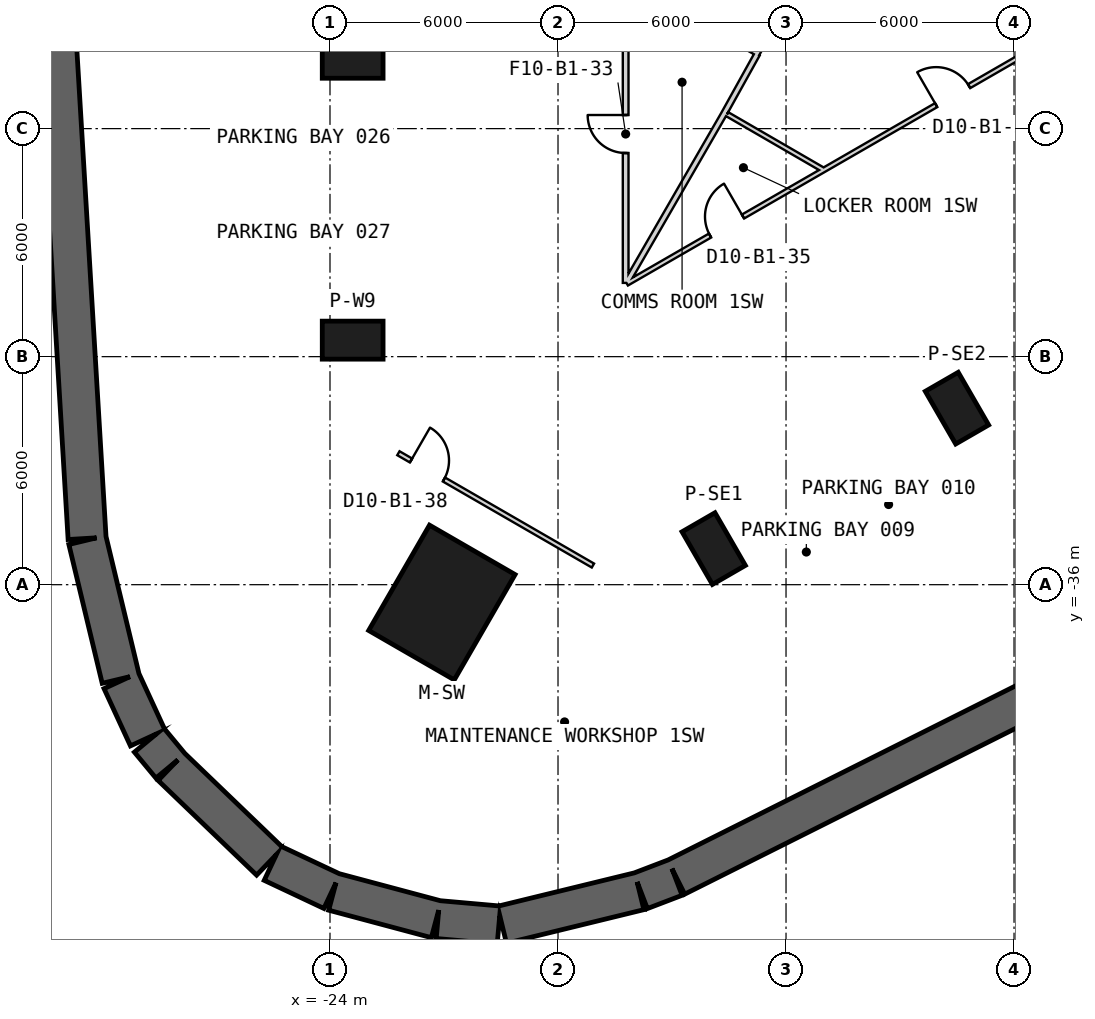
"""IFC4 building model, lengths in metres.
Left out: names, types, materials, properties, quantities, classifications, styles, units other than length and angle.
Written with IfcOpenShell. Run it as: python <this file> out.ifc"""

import sys

from ifc_helpers import new_model, si_unit, direction, frame, frame_2d, origin, origin_2d, place, context, subcontext, project, spatial, rectangle, extrude, element, fill, save


model = new_model("IFC4")
c1 = context("Model", 3, precision=1e-05, world=origin(), true_north=direction((0.0, 1.0)))
c2 = subcontext(c1, "Body", "Model", "MODEL_VIEW")
j1 = project(units=[si_unit("LENGTHUNIT", "METRE"), si_unit("PLANEANGLEUNIT", "RADIAN")], contexts=[c1])
p1 = place(None, origin())
s1 = spatial("IfcSite", under=j1, at=p1, CompositionType="ELEMENT")
p2 = place(p1, origin())
s2 = spatial("IfcBuilding", under=s1, at=p2, CompositionType="ELEMENT")
p3 = place(p2, frame((0.0, 0.0, -5.5)))
s3 = spatial("IfcBuildingStorey", under=s2, at=p3, CompositionType="ELEMENT", Elevation=-5.5)
p4 = place(p3, frame((-2.296, -37.386, 0.0), z_axis=(0.0, 0.0, 1.0), x_axis=(-0.894073358408, -0.447920561914, 0.0)))
e1 = element("IfcWall", 1, at=p4, inside=s3, PredefinedType="SHEAR", context=c2, shape_type="SweptSolid", body=[
    extrude(rectangle(XDim=14.087, YDim=1.0, at=frame_2d((7.043, 0.0))), origin(), (0.0, 0.0, 1.0), 5.5),
])
p5 = place(p3, frame((-14.913, -43.706, 0.0), z_axis=(0.0, 0.0, 1.0), x_axis=(-0.934037171443, -0.35717581436, 0.0)))
e2 = element("IfcWall", 2, at=p5, inside=s3, PredefinedType="SHEAR", context=c2, shape_type="SweptSolid", body=[
    extrude(rectangle(XDim=0.98, YDim=1.0, at=frame_2d((0.49, 0.0))), origin(), (0.0, 0.0, 1.0), 5.5),
])
p6 = place(p3, frame((-15.858, -44.065, 0.0), z_axis=(0.0, 0.0, 1.0), x_axis=(-0.971462854696, -0.23719174089, 0.0)))
e3 = element("IfcWall", 3, at=p6, inside=s3, PredefinedType="SHEAR", context=c2, shape_type="SweptSolid", body=[
    extrude(rectangle(XDim=3.722, YDim=1.0, at=frame_2d((1.861, 0.0))), origin(), (0.0, 0.0, 1.0), 5.5),
])
p7 = place(p3, frame((-19.556, -44.954, 0.0), z_axis=(0.0, 0.0, 1.0), x_axis=(-0.996078576516, 0.088472986872, 0.0)))
e4 = element("IfcWall", 4, at=p7, inside=s3, PredefinedType="SHEAR", context=c2, shape_type="SweptSolid", body=[
    extrude(rectangle(XDim=1.612, YDim=1.0, at=frame_2d((0.806, 0.0))), origin(), (0.0, 0.0, 1.0), 5.5),
])
p8 = place(p3, frame((-21.203, -44.804, 0.0), z_axis=(0.0, 0.0, 1.0), x_axis=(-0.966098633902, 0.258173254954, 0.0)))
e5 = element("IfcWall", 5, at=p8, inside=s3, PredefinedType="SHEAR", context=c2, shape_type="SweptSolid", body=[
    extrude(rectangle(XDim=2.797, YDim=1.0, at=frame_2d((1.398, 0.0))), origin(), (0.0, 0.0, 1.0), 5.5),
])
p9 = place(p3, frame((-23.948, -44.067, 0.0), z_axis=(0.0, 0.0, 1.0), x_axis=(-0.904675187163, 0.42610187248, 0.0)))
e6 = element("IfcWall", 6, at=p9, inside=s3, PredefinedType="SHEAR", context=c2, shape_type="SweptSolid", body=[
    extrude(rectangle(XDim=1.736, YDim=1.0, at=frame_2d((0.868, 0.0))), origin(), (0.0, 0.0, 1.0), 5.5),
])
p10 = place(p3, frame((-25.585, -43.281, 0.0), z_axis=(0.0, 0.0, 1.0), x_axis=(-0.720994904491, 0.692940363738, 0.0)))
e7 = element("IfcWall", 7, at=p10, inside=s3, PredefinedType="SHEAR", context=c2, shape_type="SweptSolid", body=[
    extrude(rectangle(XDim=3.594, YDim=1.0, at=frame_2d((1.797, 0.0))), origin(), (0.0, 0.0, 1.0), 5.5),
])
p11 = place(p3, frame((-28.195, -40.77, 0.0), z_axis=(0.0, 0.0, 1.0), x_axis=(-0.638451148032, 0.769662349071, 0.0)))
e8 = element("IfcWall", 8, at=p11, inside=s3, PredefinedType="SHEAR", context=c2, shape_type="SweptSolid", body=[
    extrude(rectangle(XDim=0.887, YDim=1.0, at=frame_2d((0.444, 0.0))), origin(), (0.0, 0.0, 1.0), 5.5),
])
p12 = place(p3, frame((-28.796, -40.032, 0.0), z_axis=(0.0, 0.0, 1.0), x_axis=(-0.419048850016, 0.907963689417, 0.0)))
e9 = element("IfcWall", 9, at=p12, inside=s3, PredefinedType="SHEAR", context=c2, shape_type="SweptSolid", body=[
    extrude(rectangle(XDim=1.66, YDim=1.0, at=frame_2d((0.83, 0.0))), origin(), (0.0, 0.0, 1.0), 5.5),
])
p13 = place(p3, frame((-29.508, -38.479, 0.0), z_axis=(0.0, 0.0, 1.0), x_axis=(-0.233520396998, 0.972351903472, 0.0)))
e10 = element("IfcWall", 10, at=p13, inside=s3, PredefinedType="SHEAR", context=c2, shape_type="SweptSolid", body=[
    extrude(rectangle(XDim=3.758, YDim=1.0, at=frame_2d((1.879, 0.0))), origin(), (0.0, 0.0, 1.0), 5.5),
])
p14 = place(p3, frame((-30.392, -34.782, 0.0), z_axis=(0.0, 0.0, 1.0), x_axis=(-0.059791438035, 0.998210891514, 0.0)))
e11 = element("IfcWall", 11, at=p14, inside=s3, PredefinedType="SHEAR", context=c2, shape_type="SweptSolid", body=[
    extrude(rectangle(XDim=13.797, YDim=1.0, at=frame_2d((6.898, 0.0))), origin(), (0.0, 0.0, 1.0), 5.5),
])
p15 = place(p3, frame((-21.056, -36.469, 0.0), z_axis=(0.0, 0.0, 1.0), x_axis=(-0.5, -0.866025403784, 0.0)))
e12 = element("IfcColumn", 12, at=p15, inside=s3, PredefinedType="COLUMN", context=c2, shape_type="SweptSolid", body=[
    extrude(rectangle(XDim=3.2, YDim=2.6, at=origin_2d()), origin(), (0.0, 0.0, 1.0), 5.5),
])
for number, where, z_axis, x_axis in (
    (13, (-23.403, -22.174, 0.0), (0.0, 0.0, 1.0), (-1.0, 0.0, 0.0)),
    (14, (-23.403, -29.566, 0.0), (0.0, 0.0, 1.0), (-1.0, 0.0, 0.0)),
    (15, (-13.903, -35.051, 0.0), (0.0, 0.0, 1.0), (0.5, -0.866, 0.0)),
    (16, (-7.502, -31.355, 0.0), (0.0, 0.0, 1.0), (0.5, -0.866, 0.0)),
):
    element("IfcColumn", number, at=place(p3, frame(where, z_axis=z_axis, x_axis=x_axis)), inside=s3, PredefinedType="COLUMN", context=c2, shape_type="SweptSolid", body=[
        extrude(rectangle(XDim=1.6, YDim=1.0, at=origin_2d()), origin(), (0.0, 0.0, 1.0), 5.5),
    ])
p16 = place(p3, frame((-16.19, -28.077, 0.0), z_axis=(0.0, 0.0, 1.0), x_axis=(0.866271440356, 0.499573609816, 0.0)))
e17 = element("IfcWall", 17, at=p16, inside=s3, PredefinedType="PARTITIONING", context=c2, shape_type="SweptSolid", body=[
    extrude(rectangle(XDim=20.117, YDim=0.12, at=frame_2d((10.059, 0.0))), origin(), (0.0, 0.0, 1.0), 4.07),
])
p17 = place(p16, frame((9.397, 0.0, 0.0)))
e18 = element("IfcOpeningElement", 18, at=p17, cuts=e17, PredefinedType="OPENING", context=c2, shape_type="SweptSolid", body=[
    extrude(rectangle(XDim=1.0, YDim=2.1, at=frame_2d((0.5, 1.05))), frame((0.0, 0.07, 0.0), z_axis=(0.0, -1.0, 0.0), x_axis=(1.0, 0.0, 0.0)), (0.0, 0.0, 1.0), 0.14),
])
p18 = place(p16, frame((2.53, 0.0, 0.0)))
e19 = element("IfcOpeningElement", 19, at=p18, cuts=e17, PredefinedType="OPENING", context=c2, shape_type="SweptSolid", body=[
    extrude(rectangle(XDim=1.0, YDim=2.1, at=frame_2d((0.5, 1.05))), frame((0.0, 0.07, 0.0), z_axis=(0.0, -1.0, 0.0), x_axis=(1.0, 0.0, 0.0)), (0.0, 0.0, 1.0), 0.14),
])
p19 = place(p3, frame((-16.22, -28.059, 0.0), z_axis=(0.0, 0.0, 1.0), x_axis=(0.0, 1.0, 0.0)))
e20 = element("IfcWall", 20, at=p19, inside=s3, PredefinedType="PLUMBINGWALL", context=c2, shape_type="SweptSolid", body=[
    extrude(rectangle(XDim=8.006, YDim=0.15, at=frame_2d((4.003, 0.0))), origin(), (0.0, 0.0, 1.0), 4.07),
])
p20 = place(p19, frame((3.417, 0.0, 0.0)))
e21 = element("IfcOpeningElement", 21, at=p20, cuts=e20, PredefinedType="OPENING", context=c2, shape_type="SweptSolid", body=[
    extrude(rectangle(XDim=1.0, YDim=2.1, at=frame_2d((0.5, 1.05))), frame((0.0, 0.085, 0.0), z_axis=(0.0, -1.0, 0.0), x_axis=(1.0, 0.0, 0.0)), (0.0, 0.0, 1.0), 0.17),
])
p21 = place(p3, frame((-22.2, -32.541, 0.0), z_axis=(0.0, 0.0, 1.0), x_axis=(0.866020498397, -0.500008496284, 0.0)))
e22 = element("IfcWall", 22, at=p21, inside=s3, PredefinedType="PARTITIONING", context=c2, shape_type="SweptSolid", body=[
    extrude(rectangle(XDim=5.911, YDim=0.12, at=frame_2d((2.955, 0.0))), origin(), (0.0, 0.0, 1.0), 4.07),
])
p22 = place(p21, frame((0.383, 0.0, 0.0)))
e23 = element("IfcOpeningElement", 23, at=p22, cuts=e22, PredefinedType="OPENING", context=c2, shape_type="SweptSolid", body=[
    extrude(rectangle(XDim=1.0, YDim=2.1, at=frame_2d((0.5, 1.05))), frame((0.0, 0.07, 0.0), z_axis=(0.0, -1.0, 0.0), x_axis=(1.0, 0.0, 0.0)), (0.0, 0.0, 1.0), 0.14),
])
p23 = place(p3, frame((-16.2, -20.023, 0.0), z_axis=(0.0, 0.0, 1.0), x_axis=(0.866525298426, -0.499133155769, 0.0)))
e24 = element("IfcWall", 24, at=p23, inside=s3, PredefinedType="PLUMBINGWALL", context=c2, shape_type="SweptSolid", body=[
    extrude(rectangle(XDim=4.018, YDim=0.15, at=frame_2d((2.009, 0.0))), origin(), (0.0, 0.0, 1.0), 4.07),
])
p24 = place(p3, frame((-10.549, -18.212, 0.0), z_axis=(0.0, 0.0, 1.0), x_axis=(-0.500006121477, -0.866021869519, 0.0)))
e25 = element("IfcWall", 25, at=p24, inside=s3, PredefinedType="PARTITIONING", context=c2, shape_type="SweptSolid", body=[
    extrude(rectangle(XDim=4.42, YDim=0.12, at=frame_2d((2.21, 0.0))), origin(), (0.0, 0.0, 1.0), 4.07),
])
p25 = place(p3, frame((-12.759, -22.04, 0.0), z_axis=(0.0, 0.0, 1.0), x_axis=(-0.485722500315, -0.874113066306, 0.0)))
e26 = element("IfcWall", 26, at=p25, inside=s3, PredefinedType="PLUMBINGWALL", context=c2, shape_type="SweptSolid", body=[
    extrude(rectangle(XDim=1.823, YDim=0.15, at=frame_2d((0.912, 0.0))), origin(), (0.0, 0.0, 1.0), 4.07),
])
p26 = place(p3, frame((-16.2, -28.059, 0.0), z_axis=(0.0, 0.0, 1.0), x_axis=(0.499979710414, 0.866037117665, 0.0)))
e27 = element("IfcWall", 27, at=p26, inside=s3, PredefinedType="PLUMBINGWALL", context=c2, shape_type="SweptSolid", body=[
    extrude(rectangle(XDim=5.23, YDim=0.15, at=frame_2d((2.615, 0.0))), origin(), (0.0, 0.0, 1.0), 4.07),
])
p27 = place(p3, frame((-13.55, -23.619, 0.0), z_axis=(0.0, 0.0, 1.0), x_axis=(0.865340043372, -0.501185204627, 0.0)))
e28 = element("IfcWall", 28, at=p27, inside=s3, PredefinedType="PARTITIONING", context=c2, shape_type="SweptSolid", body=[
    extrude(rectangle(XDim=2.908, YDim=0.12, at=frame_2d((1.454, 0.0))), origin(), (0.0, 0.0, 1.0), 4.07),
])
p28 = place(p20, origin())
e29 = element("IfcDoor", 29, at=p28, inside=s3, OperationType="SINGLE_SWING_RIGHT", PredefinedType="USERDEFINED", context=c2, shape_type="SweptSolid", body=[
    extrude(rectangle(XDim=1.0, YDim=2.1, at=frame_2d((0.5, 1.05))), frame((0.0, 0.025, 0.0), z_axis=(0.0, -1.0, 0.0), x_axis=(1.0, 0.0, 0.0)), (0.0, 0.0, 1.0), 0.05),
])
fill(e21, e29)
p29 = place(p17, origin())
e30 = element("IfcDoor", 30, at=p29, inside=s3, OperationType="SINGLE_SWING_LEFT", PredefinedType="NOTDEFINED", context=c2, shape_type="SweptSolid", body=[
    extrude(rectangle(XDim=1.0, YDim=2.1, at=frame_2d((0.5, 1.05))), frame((0.0, 0.025, 0.0), z_axis=(0.0, -1.0, 0.0), x_axis=(1.0, 0.0, 0.0)), (0.0, 0.0, 1.0), 0.05),
])
fill(e18, e30)
p30 = place(p18, origin())
e31 = element("IfcDoor", 31, at=p30, inside=s3, OperationType="SINGLE_SWING_RIGHT", PredefinedType="NOTDEFINED", context=c2, shape_type="SweptSolid", body=[
    extrude(rectangle(XDim=1.0, YDim=2.1, at=frame_2d((0.5, 1.05))), frame((0.0, 0.025, 0.0), z_axis=(0.0, -1.0, 0.0), x_axis=(1.0, 0.0, 0.0)), (0.0, 0.0, 1.0), 0.05),
])
fill(e19, e31)
p31 = place(p22, origin())
e32 = element("IfcDoor", 32, at=p31, inside=s3, OperationType="SINGLE_SWING_LEFT", PredefinedType="NOTDEFINED", context=c2, shape_type="SweptSolid", body=[
    extrude(rectangle(XDim=1.0, YDim=2.1, at=frame_2d((0.5, 1.05))), frame((0.0, 0.025, 0.0), z_axis=(0.0, -1.0, 0.0), x_axis=(1.0, 0.0, 0.0)), (0.0, 0.0, 1.0), 0.05),
])
fill(e23, e32)
save(model, sys.argv[1])
